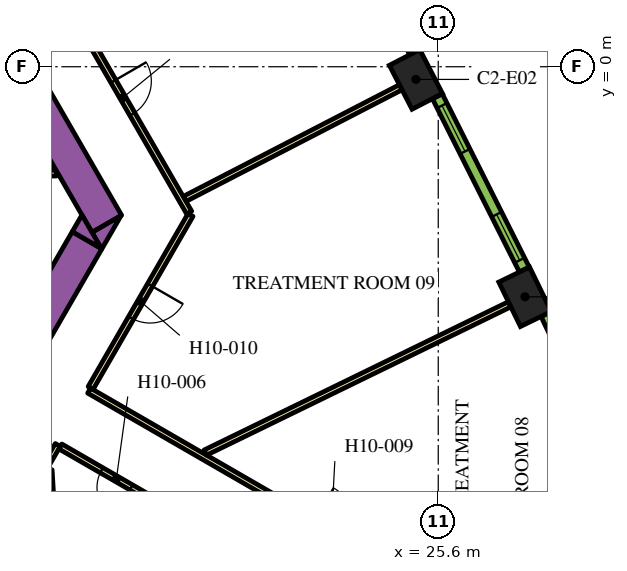
"""IFC4 building model, lengths in metres.
Left out: names, types, materials, properties, quantities, classifications, styles, units other than length and angle.
Written with IfcOpenShell. Run it as: python <this file> out.ifc"""

import sys

from ifc_helpers import new_model, si_unit, direction, frame, frame_2d, origin, origin_2d, place, context, subcontext, project, spatial, polyline, rectangle, outline, extrude, element, fill, save


model = new_model("IFC4")
c1 = context("Model", 3, precision=1e-05, world=origin(), true_north=direction((0.0, 1.0)))
c2 = subcontext(c1, "Body", "Model", "MODEL_VIEW")
j1 = project(units=[si_unit("LENGTHUNIT", "METRE"), si_unit("PLANEANGLEUNIT", "RADIAN")], contexts=[c1])
p1 = place(None, origin())
s1 = spatial("IfcSite", under=j1, at=p1, CompositionType="ELEMENT")
p2 = place(p1, origin())
s2 = spatial("IfcBuilding", under=s1, at=p2, CompositionType="ELEMENT")
p3 = place(p2, frame((0.0, 0.0, 130.5)))
s3 = spatial("IfcBuildingStorey", under=s2, at=p3, CompositionType="ELEMENT", Elevation=130.5)
for number, where, z_axis, x_axis in (
    (1, (27.883, -6.054, 0.0), (0.0, 0.0, 1.0), (-0.438, 0.899, 0.0)),
    (2, (25.012, -0.334, 0.0), (0.0, 0.0, 1.0), (-0.459, 0.888, 0.0)),
):
    element("IfcColumn", number, at=place(p3, frame(where, z_axis=z_axis, x_axis=x_axis)), inside=s3, PredefinedType="COLUMN", context=c2, shape_type="SweptSolid", body=[
        extrude(rectangle(XDim=1.3, YDim=0.9, at=origin_2d()), origin(), (0.0, 0.0, 1.0), 3.9),
    ])
p4 = place(p3, frame((6.776, 13.364, 0.0), z_axis=(0.0, 0.0, 1.0), x_axis=(0.500004177138, -0.8660229921, 0.0)))
e3 = element("IfcWall", 3, at=p4, inside=s3, PredefinedType="SOLIDWALL", context=c2, shape_type="SweptSolid", body=[
    extrude(rectangle(XDim=20.204, YDim=0.9, at=frame_2d((10.102, 0.0))), origin(), (0.0, 0.0, 1.0), 3.9),
])
p5 = place(p3, origin())
e4 = element("IfcWall", 4, at=p5, inside=s3, PredefinedType="SOLIDWALL", context=c2, shape_type="SweptSolid", body=[
    extrude(outline(polyline([(16.743, -4.8), (16.489, -4.36), (17.251, -3.92), (16.743, -4.8)])), origin(), (0.0, 0.0, 1.0), 3.9),
])
p6 = place(p3, frame((11.695, -12.644, 0.0), z_axis=(0.0, 0.0, 1.0), x_axis=(0.500010229568, 0.86601949766, 0.0)))
e5 = element("IfcWall", 5, at=p6, inside=s3, PredefinedType="SOLIDWALL", context=c2, shape_type="SweptSolid", body=[
    extrude(rectangle(XDim=9.326, YDim=0.9, at=frame_2d((4.663, 0.0))), origin(), (0.0, 0.0, 1.0), 3.9),
])
e6 = element("IfcWall", 6, at=p5, inside=s3, PredefinedType="SOLIDWALL", context=c2, shape_type="SweptSolid", body=[
    extrude(outline(polyline([(16.223, -3.9), (16.732, -4.78), (15.969, -4.34), (16.223, -3.9)])), origin(), (0.0, 0.0, 1.0), 3.9),
])
p7 = place(p3, frame((12.915, -2.8, 0.0), z_axis=(0.0, 0.0, 1.0), x_axis=(1.0, 0.0, 0.0)))
e7 = element("IfcWall", 7, at=p7, inside=s3, PredefinedType="PARTITIONING", context=c2, shape_type="SweptSolid", body=[
    extrude(rectangle(XDim=2.637, YDim=0.15, at=frame_2d((1.318, 0.0))), origin(), (0.0, 0.0, 1.0), 2.6),
])
p8 = place(p3, frame((16.412, -8.523, 0.0), z_axis=(0.0, 0.0, 1.0), x_axis=(0.866025629663, -0.499999608766, 0.0)))
e8 = element("IfcWall", 8, at=p8, inside=s3, PredefinedType="PARTITIONING", context=c2, shape_type="SweptSolid", body=[
    extrude(rectangle(XDim=13.624, YDim=0.15, at=frame_2d((6.812, 0.0))), origin(), (0.0, 0.0, 1.0), 2.6),
])
p9 = place(p8, frame((6.854, 0.0, 0.0)))
e9 = element("IfcOpeningElement", 9, at=p9, cuts=e8, PredefinedType="OPENING", context=c2, shape_type="SweptSolid", body=[
    extrude(rectangle(XDim=1.0, YDim=2.1, at=frame_2d((0.5, 1.05))), frame((0.0, 0.085, 0.0), z_axis=(0.0, -1.0, 0.0), x_axis=(1.0, 0.0, 0.0)), (0.0, 0.0, 1.0), 0.17),
])
p10 = place(p3, frame((19.081, -3.9, 0.0), z_axis=(0.0, 0.0, 1.0), x_axis=(-0.499974327079, -0.866040225545, 0.0)))
e10 = element("IfcWall", 10, at=p10, inside=s3, PredefinedType="PARTITIONING", context=c2, shape_type="SweptSolid", body=[
    extrude(rectangle(XDim=5.258, YDim=0.15, at=frame_2d((2.629, 0.0))), origin(), (0.0, 0.0, 1.0), 2.6),
])
p11 = place(p10, frame((2.129, 0.0, 0.0)))
e11 = element("IfcOpeningElement", 11, at=p11, cuts=e10, PredefinedType="OPENING", context=c2, shape_type="SweptSolid", body=[
    extrude(rectangle(XDim=1.0, YDim=2.1, at=frame_2d((0.5, 1.05))), frame((0.0, 0.085, 0.0), z_axis=(0.0, -1.0, 0.0), x_axis=(1.0, 0.0, 0.0)), (0.0, 0.0, 1.0), 0.17),
])
p12 = place(p3, frame((6.163, 18.475, 0.0), z_axis=(0.0, 0.0, 1.0), x_axis=(0.500001317485, -0.866024643133, 0.0)))
e12 = element("IfcWall", 12, at=p12, inside=s3, PredefinedType="PARTITIONING", context=c2, shape_type="SweptSolid", body=[
    extrude(rectangle(XDim=25.767, YDim=0.15, at=frame_2d((12.883, 0.0))), origin(), (0.0, 0.0, 1.0), 2.6),
])
p13 = place(p12, frame((21.774, 0.0, 0.0)))
e13 = element("IfcOpeningElement", 13, at=p13, cuts=e12, PredefinedType="OPENING", context=c2, shape_type="SweptSolid", body=[
    extrude(rectangle(XDim=1.0, YDim=2.1, at=frame_2d((0.5, 1.05))), frame((0.0, 0.085, 0.0), z_axis=(0.0, -1.0, 0.0), x_axis=(1.0, 0.0, 0.0)), (0.0, 0.0, 1.0), 0.17),
])
p14 = place(p12, frame((15.571, 0.0, 0.0)))
e14 = element("IfcOpeningElement", 14, at=p14, cuts=e12, PredefinedType="OPENING", context=c2, shape_type="SweptSolid", body=[
    extrude(rectangle(XDim=1.0, YDim=2.1, at=frame_2d((0.5, 1.05))), frame((0.0, 0.085, 0.0), z_axis=(0.0, -1.0, 0.0), x_axis=(1.0, 0.0, 0.0)), (0.0, 0.0, 1.0), 0.17),
])
p15 = place(p12, frame((9.265, 0.0, 0.0)))
e15 = element("IfcOpeningElement", 15, at=p15, cuts=e12, PredefinedType="OPENING", context=c2, shape_type="SweptSolid", body=[
    extrude(rectangle(XDim=1.0, YDim=2.1, at=frame_2d((0.5, 1.05))), frame((0.0, 0.085, 0.0), z_axis=(0.0, -1.0, 0.0), x_axis=(1.0, 0.0, 0.0)), (0.0, 0.0, 1.0), 0.17),
])
p16 = place(p12, frame((3.063, 0.0, 0.0)))
e16 = element("IfcOpeningElement", 16, at=p16, cuts=e12, PredefinedType="OPENING", context=c2, shape_type="SweptSolid", body=[
    extrude(rectangle(XDim=1.0, YDim=2.1, at=frame_2d((0.5, 1.05))), frame((0.0, 0.085, 0.0), z_axis=(0.0, -1.0, 0.0), x_axis=(1.0, 0.0, 0.0)), (0.0, 0.0, 1.0), 0.17),
])
p17 = place(p3, frame((15.587, -9.952, 0.0), z_axis=(0.0, 0.0, 1.0), x_axis=(-0.500016618951, -0.866015808616, 0.0)))
e17 = element("IfcWall", 17, at=p17, inside=s3, PredefinedType="PARTITIONING", context=c2, shape_type="SweptSolid", body=[
    extrude(rectangle(XDim=5.268, YDim=0.15, at=frame_2d((2.634, 0.0))), origin(), (0.0, 0.0, 1.0), 2.6),
])
p18 = place(p17, frame((2.538, 0.0, 0.0)))
e18 = element("IfcOpeningElement", 18, at=p18, cuts=e17, PredefinedType="OPENING", context=c2, shape_type="SweptSolid", body=[
    extrude(rectangle(XDim=0.9, YDim=2.1, at=frame_2d((0.45, 1.05))), frame((0.0, 0.085, 0.0), z_axis=(0.0, -1.0, 0.0), x_axis=(1.0, 0.0, 0.0)), (0.0, 0.0, 1.0), 0.17),
])
p19 = place(p3, frame((27.386, -16.764, 0.0), z_axis=(0.0, 0.0, 1.0), x_axis=(-0.866022585856, 0.500004880763, 0.0)))
e19 = element("IfcWall", 19, at=p19, inside=s3, PredefinedType="PARTITIONING", context=c2, shape_type="SweptSolid", body=[
    extrude(rectangle(XDim=13.544, YDim=0.15, at=frame_2d((6.772, 0.0))), origin(), (0.0, 0.0, 1.0), 2.6),
])
p20 = place(p19, frame((11.392, 0.0, 0.0)))
e20 = element("IfcOpeningElement", 20, at=p20, cuts=e19, PredefinedType="OPENING", context=c2, shape_type="SweptSolid", body=[
    extrude(rectangle(XDim=0.9, YDim=2.1, at=frame_2d((0.45, 1.05))), frame((0.0, 0.085, 0.0), z_axis=(0.0, -1.0, 0.0), x_axis=(1.0, 0.0, 0.0)), (0.0, 0.0, 1.0), 0.17),
])
p21 = place(p19, frame((8.491, 0.0, 0.0)))
e21 = element("IfcOpeningElement", 21, at=p21, cuts=e19, PredefinedType="OPENING", context=c2, shape_type="SweptSolid", body=[
    extrude(rectangle(XDim=1.0, YDim=2.1, at=frame_2d((0.5, 1.05))), frame((0.0, 0.085, 0.0), z_axis=(0.0, -1.0, 0.0), x_axis=(1.0, 0.0, 0.0)), (0.0, 0.0, 1.0), 0.17),
])
p22 = place(p3, frame((15.999, -21.467, 0.0), z_axis=(0.0, 0.0, 1.0), x_axis=(-0.058433825336, 0.998291284173, 0.0)))
e22 = element("IfcWall", 22, at=p22, inside=s3, PredefinedType="PARTITIONING", context=c2, shape_type="SweptSolid", body=[
    extrude(rectangle(XDim=10.875, YDim=0.15, at=frame_2d((5.438, 0.0))), origin(), (0.0, 0.0, 1.0), 2.6),
])
p23 = place(p3, frame((24.613, -0.541, 0.0), z_axis=(0.0, 0.0, 1.0), x_axis=(-0.888459912519, -0.458954228487, 0.0)))
e23 = element("IfcWall", 23, at=p23, inside=s3, PredefinedType="PARTITIONING", context=c2, shape_type="SweptSolid", body=[
    extrude(rectangle(XDim=6.392, YDim=0.15, at=frame_2d((3.196, 0.0))), origin(), (0.0, 0.0, 1.0), 2.6),
])
p24 = place(p3, frame((27.479, -6.251, 0.0), z_axis=(0.0, 0.0, 1.0), x_axis=(-0.898945877276, -0.438059710231, 0.0)))
e24 = element("IfcWall", 24, at=p24, inside=s3, PredefinedType="PARTITIONING", context=c2, shape_type="SweptSolid", body=[
    extrude(rectangle(XDim=8.909, YDim=0.15, at=frame_2d((4.455, 0.0))), origin(), (0.0, 0.0, 1.0), 2.6),
])
p25 = place(p3, frame((30.62, -11.127, 0.0), z_axis=(0.0, 0.0, 1.0), x_axis=(-0.427543726596, 0.903994669148, 0.0)))
e25 = element("IfcWall", 25, at=p25, inside=s3, PredefinedType="SOLIDWALL", context=c2, shape_type="SweptSolid", body=[
    extrude(rectangle(XDim=5.107, YDim=0.29, at=frame_2d((2.553, 0.0))), origin(), (0.0, 0.0, 1.0), 3.5),
])
p26 = place(p25, frame((0.24, 0.0, 0.9)))
e26 = element("IfcOpeningElement", 26, at=p26, cuts=e25, PredefinedType="OPENING", context=c2, shape_type="SweptSolid", body=[
    extrude(rectangle(XDim=1.35, YDim=2.15, at=frame_2d((0.675, 1.075))), frame((0.0, 0.155, 0.0), z_axis=(0.0, -1.0, 0.0), x_axis=(1.0, 0.0, 0.0)), (0.0, 0.0, 1.0), 0.31),
])
p27 = place(p25, frame((3.471, 0.0, 0.9)))
e27 = element("IfcOpeningElement", 27, at=p27, cuts=e25, PredefinedType="OPENING", context=c2, shape_type="SweptSolid", body=[
    extrude(rectangle(XDim=1.35, YDim=2.15, at=frame_2d((0.675, 1.075))), frame((0.0, 0.155, 0.0), z_axis=(0.0, -1.0, 0.0), x_axis=(1.0, 0.0, 0.0)), (0.0, 0.0, 1.0), 0.31),
])
p28 = place(p3, frame((27.864, -5.336, 0.0), z_axis=(0.0, 0.0, 1.0), x_axis=(-0.448534297211, 0.893765620409, 0.0)))
e28 = element("IfcWall", 28, at=p28, inside=s3, PredefinedType="SOLIDWALL", context=c2, shape_type="SweptSolid", body=[
    extrude(rectangle(XDim=5.1, YDim=0.29, at=frame_2d((2.55, 0.0))), origin(), (0.0, 0.0, 1.0), 3.5),
])
p29 = place(p28, frame((0.272, 0.0, 0.9)))
e29 = element("IfcOpeningElement", 29, at=p29, cuts=e28, PredefinedType="OPENING", context=c2, shape_type="SweptSolid", body=[
    extrude(rectangle(XDim=1.35, YDim=2.15, at=frame_2d((0.675, 1.075))), frame((0.0, 0.155, 0.0), z_axis=(0.0, -1.0, 0.0), x_axis=(1.0, 0.0, 0.0)), (0.0, 0.0, 1.0), 0.31),
])
p30 = place(p28, frame((3.478, 0.0, 0.9)))
e30 = element("IfcOpeningElement", 30, at=p30, cuts=e28, PredefinedType="OPENING", context=c2, shape_type="SweptSolid", body=[
    extrude(rectangle(XDim=1.35, YDim=2.15, at=frame_2d((0.675, 1.075))), frame((0.0, 0.155, 0.0), z_axis=(0.0, -1.0, 0.0), x_axis=(1.0, 0.0, 0.0)), (0.0, 0.0, 1.0), 0.31),
])
p31 = place(p3, frame((24.977, 0.383, 0.0), z_axis=(0.0, 0.0, 1.0), x_axis=(-0.469323203119, 0.883026461106, 0.0)))
e31 = element("IfcWall", 31, at=p31, inside=s3, PredefinedType="SOLIDWALL", context=c2, shape_type="SweptSolid", body=[
    extrude(rectangle(XDim=5.101, YDim=0.29, at=frame_2d((2.55, 0.0))), origin(), (0.0, 0.0, 1.0), 3.5),
])
p32 = place(p31, frame((0.273, 0.0, 0.9)))
e32 = element("IfcOpeningElement", 32, at=p32, cuts=e31, PredefinedType="OPENING", context=c2, shape_type="SweptSolid", body=[
    extrude(rectangle(XDim=1.35, YDim=2.15, at=frame_2d((0.675, 1.075))), frame((0.0, 0.155, 0.0), z_axis=(0.0, -1.0, 0.0), x_axis=(1.0, 0.0, 0.0)), (0.0, 0.0, 1.0), 0.31),
])
p33 = place(p31, frame((3.478, 0.0, 0.9)))
e33 = element("IfcOpeningElement", 33, at=p33, cuts=e31, PredefinedType="OPENING", context=c2, shape_type="SweptSolid", body=[
    extrude(rectangle(XDim=1.35, YDim=2.15, at=frame_2d((0.675, 1.075))), frame((0.0, 0.155, 0.0), z_axis=(0.0, -1.0, 0.0), x_axis=(1.0, 0.0, 0.0)), (0.0, 0.0, 1.0), 0.31),
])
p34 = place(p20, origin())
e34 = element("IfcDoor", 34, at=p34, inside=s3, OperationType="SINGLE_SWING_RIGHT", PredefinedType="DOOR", context=c2, shape_type="SweptSolid", body=[
    extrude(rectangle(XDim=0.9, YDim=2.1, at=frame_2d((0.45, 1.05))), frame((0.0, 0.025, 0.0), z_axis=(0.0, -1.0, 0.0), x_axis=(1.0, 0.0, 0.0)), (0.0, 0.0, 1.0), 0.05),
])
fill(e20, e34)
p35 = place(p11, origin())
e35 = element("IfcDoor", 35, at=p35, inside=s3, OperationType="SINGLE_SWING_LEFT", PredefinedType="DOOR", context=c2, shape_type="SweptSolid", body=[
    extrude(rectangle(XDim=1.0, YDim=2.1, at=frame_2d((0.5, 1.05))), frame((0.0, 0.025, 0.0), z_axis=(0.0, -1.0, 0.0), x_axis=(1.0, 0.0, 0.0)), (0.0, 0.0, 1.0), 0.05),
])
fill(e11, e35)
p36 = place(p13, origin())
e36 = element("IfcDoor", 36, at=p36, inside=s3, OperationType="SINGLE_SWING_RIGHT", PredefinedType="DOOR", context=c2, shape_type="SweptSolid", body=[
    extrude(rectangle(XDim=1.0, YDim=2.1, at=frame_2d((0.5, 1.05))), frame((0.0, 0.025, 0.0), z_axis=(0.0, -1.0, 0.0), x_axis=(1.0, 0.0, 0.0)), (0.0, 0.0, 1.0), 0.05),
])
fill(e13, e36)
p37 = place(p29, origin())
e37 = element("IfcWindow", 37, at=p37, inside=s3, PartitioningType="DOUBLE_PANEL_VERTICAL", PredefinedType="WINDOW", context=c2, shape_type="SweptSolid", body=[
    extrude(rectangle(XDim=1.35, YDim=2.15, at=frame_2d((0.675, 1.075))), frame((0.0, 0.015, 0.0), z_axis=(0.0, -1.0, 0.0), x_axis=(1.0, 0.0, 0.0)), (0.0, 0.0, 1.0), 0.06),
])
fill(e29, e37)
p38 = place(p30, origin())
e38 = element("IfcWindow", 38, at=p38, inside=s3, PartitioningType="DOUBLE_PANEL_VERTICAL", PredefinedType="WINDOW", context=c2, shape_type="SweptSolid", body=[
    extrude(rectangle(XDim=1.35, YDim=2.15, at=frame_2d((0.675, 1.075))), frame((0.0, 0.015, 0.0), z_axis=(0.0, -1.0, 0.0), x_axis=(1.0, 0.0, 0.0)), (0.0, 0.0, 1.0), 0.06),
])
fill(e30, e38)
save(model, sys.argv[1])
